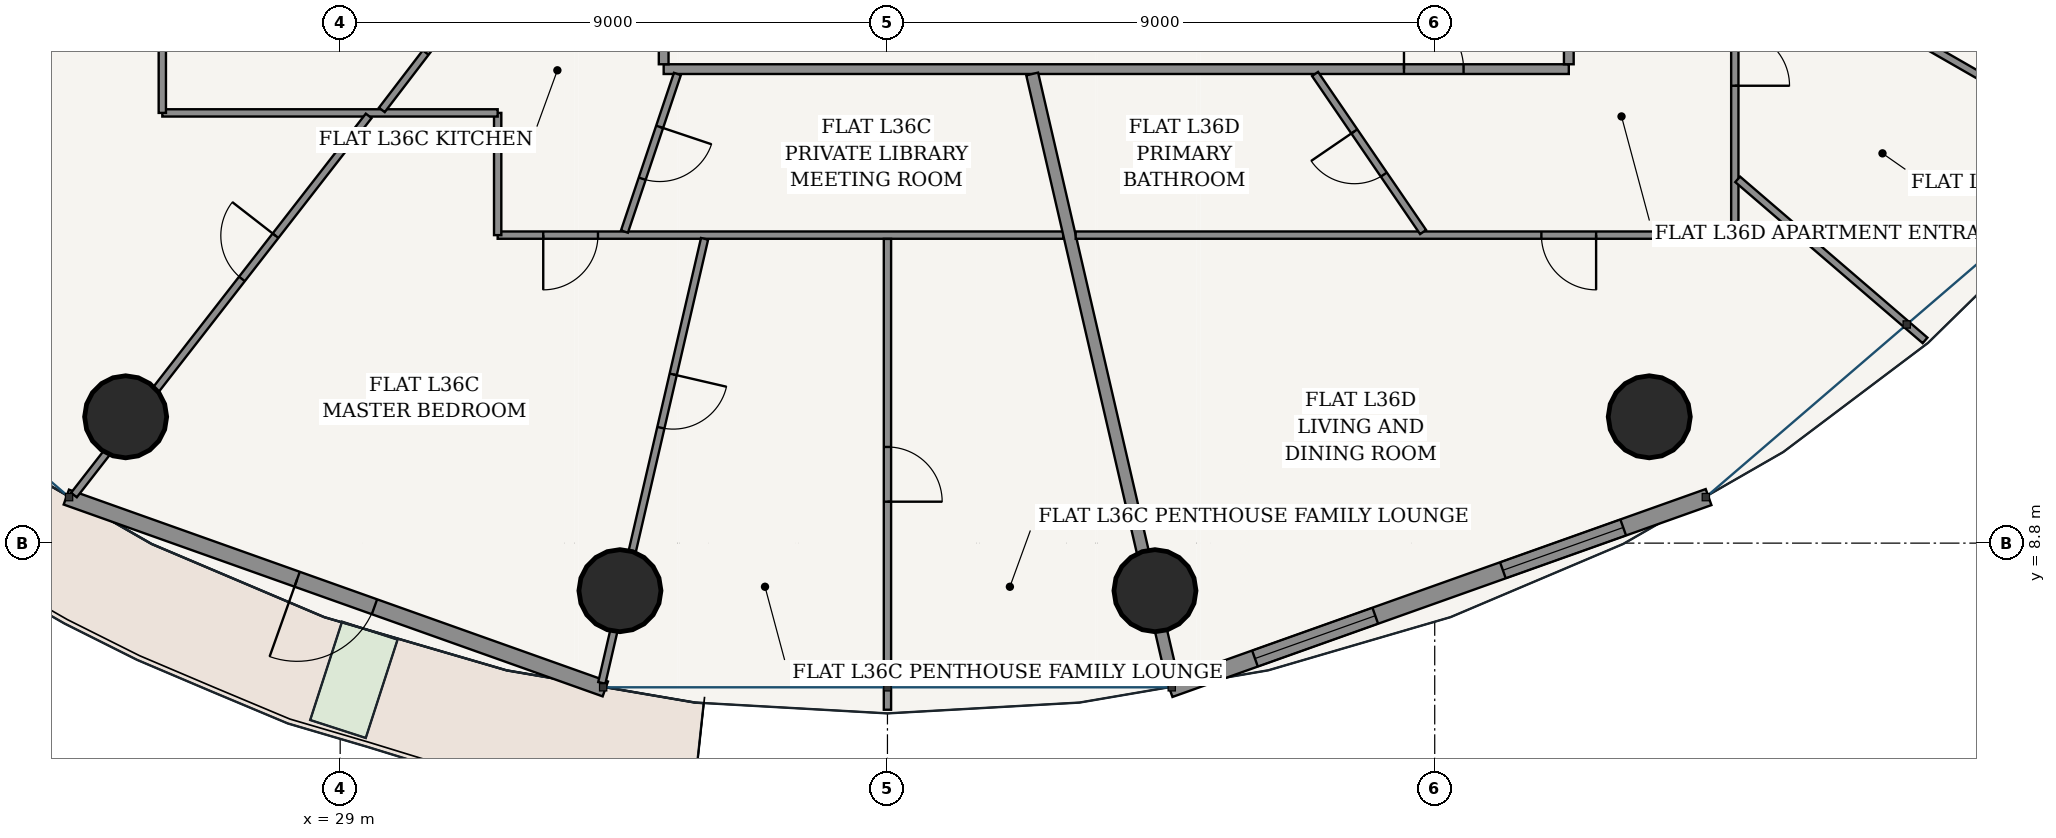
"""IFC4 building model, lengths in metres.
Left out: names, types, materials, properties, quantities, classifications, styles, units other than length and angle.
Written with IfcOpenShell. Run it as: python <this file> out.ifc"""

import sys

from ifc_helpers import new_model, si_unit, direction, frame, frame_2d, origin, origin_2d, place, context, subcontext, project, spatial, rectangle, hollow_circle, extrude, source, transform, mapped, element, fill, save


model = new_model("IFC4")
c1 = context("Model", 3, precision=1e-05, world=origin(), true_north=direction((-0.2419218956, 0.970295726276)))
c2 = subcontext(c1, "Body", "Model", "MODEL_VIEW")
j1 = project(units=[si_unit("LENGTHUNIT", "METRE"), si_unit("PLANEANGLEUNIT", "RADIAN")], contexts=[c1])
p1 = place(None, origin())
s1 = spatial("IfcSite", under=j1, at=p1, CompositionType="ELEMENT")
p2 = place(p1, origin())
s2 = spatial("IfcBuilding", under=s1, at=p2, CompositionType="ELEMENT")
p3 = place(p2, frame((0.0, 0.0, 139.0)))
s3 = spatial("IfcBuildingStorey", under=s2, at=p3, CompositionType="ELEMENT", Elevation=139.0)
for number, where, z_axis, x_axis in (
    (1, (25.472, 10.877, 0.0), (0.0, 0.0, 1.0), (1.0, 0.0, 0.0)),
    (2, (33.601, 8.018, 0.0), (0.0, 0.0, 1.0), (1.0, 0.0, 0.0)),
    (3, (42.399, 8.018, 0.0), (0.0, 0.0, 1.0), (1.0, 0.0, 0.0)),
    (4, (50.528, 10.877, 0.0), (0.0, 0.0, 1.0), (1.0, 0.0, 0.0)),
):
    element("IfcColumn", number, at=place(p3, frame(where, z_axis=z_axis, x_axis=x_axis)), inside=s3, PredefinedType="COLUMN", context=c2, shape_type="SweptSolid", body=[
        extrude(hollow_circle(Radius=0.675, WallThickness=0.042, at=origin_2d()), origin(), (0.0, 0.0, 1.0), 3.6),
    ])
p4 = place(p3, frame((24.497, 9.557, 0.0), z_axis=(0.0, 0.0, 1.0), x_axis=(0.942103604331, -0.335321932934, 0.0)))
e5 = element("IfcWall", 5, at=p4, inside=s3, PredefinedType="SOLIDWALL", context=c2, shape_type="SweptSolid", body=[
    extrude(rectangle(XDim=9.408, YDim=0.26, at=frame_2d((4.704, 0.0))), origin(), (0.0, 0.0, 1.0), 3.33),
])
p5 = place(p4, frame((4.029, 0.0, 0.0)))
e6 = element("IfcOpeningElement", 6, at=p5, cuts=e5, PredefinedType="OPENING", context=c2, shape_type="SweptSolid", body=[
    extrude(rectangle(XDim=1.35, YDim=2.2, at=frame_2d((0.675, 1.1))), frame((0.0, 0.14, 0.0), z_axis=(0.0, -1.0, 0.0), x_axis=(1.0, 0.0, 0.0)), (0.0, 0.0, 1.0), 0.28),
])
p6 = place(p3, frame((42.64, 6.402, 0.0), z_axis=(0.0, 0.0, 1.0), x_axis=(0.942103604331, 0.335321932934, 0.0)))
e7 = element("IfcWall", 7, at=p6, inside=s3, PredefinedType="SOLIDWALL", context=c2, shape_type="SweptSolid", body=[
    extrude(rectangle(XDim=9.408, YDim=0.28, at=frame_2d((4.704, 0.0))), origin(), (0.0, 0.0, 1.0), 3.33),
])
p7 = place(p6, frame((1.49, 0.0, 0.85)))
e8 = element("IfcOpeningElement", 8, at=p7, cuts=e7, PredefinedType="OPENING", context=c2, shape_type="SweptSolid", body=[
    extrude(rectangle(XDim=2.1, YDim=1.95, at=frame_2d((1.05, 0.975))), frame((0.0, 0.15, 0.0), z_axis=(0.0, -1.0, 0.0), x_axis=(1.0, 0.0, 0.0)), (0.0, 0.0, 1.0), 0.3),
])
p8 = place(p6, frame((5.818, 0.0, 0.85)))
e9 = element("IfcOpeningElement", 9, at=p8, cuts=e7, PredefinedType="OPENING", context=c2, shape_type="SweptSolid", body=[
    extrude(rectangle(XDim=2.1, YDim=1.95, at=frame_2d((1.05, 0.975))), frame((0.0, 0.15, 0.0), z_axis=(0.0, -1.0, 0.0), x_axis=(1.0, 0.0, 0.0)), (0.0, 0.0, 1.0), 0.3),
])
p9 = place(p3, frame((34.32, 16.595, 0.0), z_axis=(0.0, 0.0, 1.0), x_axis=(1.0, 0.0, 0.0)))
e10 = element("IfcWall", 10, at=p9, inside=s3, PredefinedType="PARTITIONING", context=c2, shape_type="SweptSolid", body=[
    extrude(rectangle(XDim=14.885, YDim=0.16, at=frame_2d((7.442, 0.0))), origin(), (0.0, 0.0, 1.0), 2.776),
])
p10 = place(p9, frame((12.174, 0.0, 0.0)))
e11 = element("IfcOpeningElement", 11, at=p10, cuts=e10, PredefinedType="OPENING", context=c2, shape_type="SweptSolid", body=[
    extrude(rectangle(XDim=0.98, YDim=2.2, at=frame_2d((0.49, 1.1))), frame((0.0, 0.09, 0.0), z_axis=(0.0, -1.0, 0.0), x_axis=(1.0, 0.0, 0.0)), (0.0, 0.0, 1.0), 0.18),
])
p11 = place(p3, frame((34.32, 16.675, 0.0), z_axis=(0.0, 0.0, 1.0), x_axis=(0.0, 1.0, 0.0)))
e12 = element("IfcWall", 12, at=p11, inside=s3, PredefinedType="PARTITIONING", context=c2, shape_type="SweptSolid", body=[
    extrude(rectangle(XDim=1.85, YDim=0.16, at=frame_2d((0.925, 0.0))), origin(), (0.0, 0.0, 1.0), 3.33),
])
p12 = place(p11, frame((0.435, 0.0, 0.0)))
e13 = element("IfcOpeningElement", 13, at=p12, cuts=e12, PredefinedType="OPENING", context=c2, shape_type="SweptSolid", body=[
    extrude(rectangle(XDim=0.98, YDim=2.2, at=frame_2d((0.49, 1.1))), frame((0.0, 0.09, 0.0), z_axis=(0.0, -1.0, 0.0), x_axis=(1.0, 0.0, 0.0)), (0.0, 0.0, 1.0), 0.18),
])
p13 = place(p3, frame((49.205, 16.675, 0.0), z_axis=(0.0, 0.0, 1.0), x_axis=(0.0, 1.0, 0.0)))
e14 = element("IfcWall", 14, at=p13, inside=s3, PredefinedType="PARTITIONING", context=c2, shape_type="SweptSolid", body=[
    extrude(rectangle(XDim=18.4, YDim=0.16, at=frame_2d((9.2, 0.0))), origin(), (0.0, 0.0, 1.0), 2.776),
])
p14 = place(p3, frame((40.892, 13.865, 0.0), z_axis=(0.0, 0.0, 1.0), x_axis=(-1.0, 0.0, 0.0)))
e15 = element("IfcWall", 15, at=p14, inside=s3, PredefinedType="PARTITIONING", context=c2, shape_type="SweptSolid", body=[
    extrude(rectangle(XDim=9.302, YDim=0.12, at=frame_2d((4.651, 0.0))), origin(), (0.0, 0.0, 1.0), 2.776),
])
p15 = place(p14, frame((7.652, 0.0, 0.0)))
e16 = element("IfcOpeningElement", 16, at=p15, cuts=e15, PredefinedType="OPENING", context=c2, shape_type="SweptSolid", body=[
    extrude(rectangle(XDim=0.9, YDim=2.15, at=frame_2d((0.45, 1.075))), frame((0.0, 0.07, 0.0), z_axis=(0.0, -1.0, 0.0), x_axis=(1.0, 0.0, 0.0)), (0.0, 0.0, 1.0), 0.14),
])
p16 = place(p3, frame((31.59, 13.865, 0.0), z_axis=(0.0, 0.0, 1.0), x_axis=(0.0, 1.0, 0.0)))
e17 = element("IfcWall", 17, at=p16, inside=s3, PredefinedType="PARTITIONING", context=c2, shape_type="SweptSolid", body=[
    extrude(rectangle(XDim=2.01, YDim=0.12, at=frame_2d((1.005, 0.0))), origin(), (0.0, 0.0, 1.0), 3.005),
])
p17 = place(p3, frame((31.59, 15.875, 0.0), z_axis=(0.0, 0.0, 1.0), x_axis=(-1.0, 0.0, 0.0)))
e18 = element("IfcWall", 18, at=p17, inside=s3, PredefinedType="PARTITIONING", context=c2, shape_type="SweptSolid", body=[
    extrude(rectangle(XDim=5.515, YDim=0.12, at=frame_2d((2.758, 0.0))), origin(), (0.0, 0.0, 1.0), 2.776),
])
p18 = place(p3, frame((26.075, 15.875, 0.0), z_axis=(0.0, 0.0, 1.0), x_axis=(0.0, 1.0, 0.0)))
e19 = element("IfcWall", 19, at=p18, inside=s3, PredefinedType="PARTITIONING", context=c2, shape_type="SweptSolid", body=[
    extrude(rectangle(XDim=5.715, YDim=0.12, at=frame_2d((2.857, 0.0))), origin(), (0.0, 0.0, 1.0), 2.776),
])
p19 = place(p3, frame((29.469, 15.826, 0.0), z_axis=(0.0, 0.0, 1.0), x_axis=(-0.61373942367, -0.789508657225, 0.0)))
e20 = element("IfcWall", 20, at=p19, inside=s3, PredefinedType="PARTITIONING", context=c2, shape_type="SweptSolid", body=[
    extrude(rectangle(XDim=7.898, YDim=0.12, at=frame_2d((3.949, 0.0))), origin(), (0.0, 0.0, 1.0), 2.776),
])
p20 = place(p19, frame((2.496, 0.0, 0.0)))
e21 = element("IfcOpeningElement", 21, at=p20, cuts=e20, PredefinedType="OPENING", context=c2, shape_type="SweptSolid", body=[
    extrude(rectangle(XDim=0.9, YDim=2.15, at=frame_2d((0.45, 1.075))), frame((0.0, 0.07, 0.0), z_axis=(0.0, -1.0, 0.0), x_axis=(1.0, 0.0, 0.0)), (0.0, 0.0, 1.0), 0.14),
])
p21 = place(p3, frame((34.992, 13.805, 0.0), z_axis=(0.0, 0.0, 1.0), x_axis=(-0.225447000045, -0.974255433739, 0.0)))
e22 = element("IfcWall", 22, at=p21, inside=s3, PredefinedType="PARTITIONING", context=c2, shape_type="SweptSolid", body=[
    extrude(rectangle(XDim=7.496, YDim=0.12, at=frame_2d((3.748, 0.0))), origin(), (0.0, 0.0, 1.0), 2.776),
])
p22 = place(p21, frame((2.289, 0.0, 0.0)))
e23 = element("IfcOpeningElement", 23, at=p22, cuts=e22, PredefinedType="OPENING", context=c2, shape_type="SweptSolid", body=[
    extrude(rectangle(XDim=0.9, YDim=2.15, at=frame_2d((0.45, 1.075))), frame((0.0, 0.07, 0.0), z_axis=(0.0, -1.0, 0.0), x_axis=(1.0, 0.0, 0.0)), (0.0, 0.0, 1.0), 0.14),
])
p23 = place(p3, frame((38.0, 13.803, 0.0), z_axis=(0.0, 0.0, 1.0), x_axis=(0.0, -1.0, 0.0)))
e24 = element("IfcWall", 24, at=p23, inside=s3, PredefinedType="PARTITIONING", context=c2, shape_type="SweptSolid", body=[
    extrude(rectangle(XDim=7.743, YDim=0.12, at=frame_2d((3.872, 0.0))), origin(), (0.0, 0.0, 1.0), 2.846),
])
p24 = place(p23, frame((3.421, 0.0, 0.0)))
e25 = element("IfcOpeningElement", 25, at=p24, cuts=e24, PredefinedType="OPENING", context=c2, shape_type="SweptSolid", body=[
    extrude(rectangle(XDim=0.9, YDim=2.15, at=frame_2d((0.45, 1.075))), frame((0.0, 0.07, 0.0), z_axis=(0.0, -1.0, 0.0), x_axis=(1.0, 0.0, 0.0)), (0.0, 0.0, 1.0), 0.14),
])
p25 = place(p3, frame((31.674, 18.525, 0.0), z_axis=(0.0, 0.0, 1.0), x_axis=(-0.607372594471, -0.794417101708, 0.0)))
e26 = element("IfcWall", 26, at=p25, inside=s3, PredefinedType="PARTITIONING", context=c2, shape_type="SweptSolid", body=[
    extrude(rectangle(XDim=3.274, YDim=0.12, at=frame_2d((1.637, 0.0))), origin(), (0.0, 0.0, 1.0), 3.33),
])
p26 = place(p25, frame((1.187, 0.0, 0.0)))
e27 = element("IfcOpeningElement", 27, at=p26, cuts=e26, PredefinedType="OPENING", context=c2, shape_type="SweptSolid", body=[
    extrude(rectangle(XDim=0.9, YDim=2.15, at=frame_2d((0.45, 1.075))), frame((0.0, 0.07, 0.0), z_axis=(0.0, -1.0, 0.0), x_axis=(1.0, 0.0, 0.0)), (0.0, 0.0, 1.0), 0.14),
])
p27 = place(p3, frame((34.545, 16.515, 0.0), z_axis=(0.0, 0.0, 1.0), x_axis=(-0.318424178642, -0.947948333221, 0.0)))
e28 = element("IfcWall", 28, at=p27, inside=s3, PredefinedType="PARTITIONING", context=c2, shape_type="SweptSolid", body=[
    extrude(rectangle(XDim=2.733, YDim=0.12, at=frame_2d((1.367, 0.0))), origin(), (0.0, 0.0, 1.0), 3.33),
])
p28 = place(p27, frame((0.917, 0.0, 0.0)))
e29 = element("IfcOpeningElement", 29, at=p28, cuts=e28, PredefinedType="OPENING", context=c2, shape_type="SweptSolid", body=[
    extrude(rectangle(XDim=0.9, YDim=2.15, at=frame_2d((0.45, 1.075))), frame((0.0, 0.07, 0.0), z_axis=(0.0, -1.0, 0.0), x_axis=(1.0, 0.0, 0.0)), (0.0, 0.0, 1.0), 0.14),
])
p29 = place(p3, frame((40.38, 16.515, 0.0), z_axis=(0.0, 0.0, 1.0), x_axis=(0.225473598067, -0.974249278457, 0.0)))
e30 = element("IfcWall", 30, at=p29, inside=s3, PredefinedType="PARTITIONING", context=c2, shape_type="SweptSolid", body=[
    extrude(rectangle(XDim=10.278, YDim=0.2, at=frame_2d((5.139, 0.0))), origin(), (0.0, 0.0, 1.0), 2.776),
])
p30 = place(p3, frame((51.935, 29.08, 0.0), z_axis=(0.0, 0.0, 1.0), x_axis=(0.0, -1.0, 0.0)))
e31 = element("IfcWall", 31, at=p30, inside=s3, PredefinedType="PARTITIONING", context=c2, shape_type="SweptSolid", body=[
    extrude(rectangle(XDim=15.215, YDim=0.12, at=frame_2d((7.608, 0.0))), origin(), (0.0, 0.0, 1.0), 2.776),
])
p31 = place(p30, frame((11.859, 0.0, 0.0)))
e32 = element("IfcOpeningElement", 32, at=p31, cuts=e31, PredefinedType="OPENING", context=c2, shape_type="SweptSolid", body=[
    extrude(rectangle(XDim=0.9, YDim=2.15, at=frame_2d((0.45, 1.075))), frame((0.0, 0.07, 0.0), z_axis=(0.0, -1.0, 0.0), x_axis=(1.0, 0.0, 0.0)), (0.0, 0.0, 1.0), 0.14),
])
p32 = place(p30, frame((7.49, 0.0, 0.0)))
e33 = element("IfcOpeningElement", 33, at=p32, cuts=e31, PredefinedType="OPENING", context=c2, shape_type="SweptSolid", body=[
    extrude(rectangle(XDim=0.9, YDim=2.15, at=frame_2d((0.45, 1.075))), frame((0.0, 0.07, 0.0), z_axis=(0.0, -1.0, 0.0), x_axis=(1.0, 0.0, 0.0)), (0.0, 0.0, 1.0), 0.14),
])
p33 = place(p3, frame((51.935, 13.865, 0.0), z_axis=(0.0, 0.0, 1.0), x_axis=(-1.0, 0.0, 0.0)))
e34 = element("IfcWall", 34, at=p33, inside=s3, PredefinedType="PARTITIONING", context=c2, shape_type="SweptSolid", body=[
    extrude(rectangle(XDim=10.84, YDim=0.12, at=frame_2d((5.42, 0.0))), origin(), (0.0, 0.0, 1.0), 2.776),
])
p34 = place(p33, frame((2.281, 0.0, 0.0)))
e35 = element("IfcOpeningElement", 35, at=p34, cuts=e34, PredefinedType="OPENING", context=c2, shape_type="SweptSolid", body=[
    extrude(rectangle(XDim=0.9, YDim=2.15, at=frame_2d((0.45, 1.075))), frame((0.0, 0.07, 0.0), z_axis=(0.0, -1.0, 0.0), x_axis=(1.0, 0.0, 0.0)), (0.0, 0.0, 1.0), 0.14),
])
p35 = place(p3, frame((51.982, 14.782, 0.0), z_axis=(0.0, 0.0, 1.0), x_axis=(0.758356837469, -0.651839632935, 0.0)))
e36 = element("IfcWall", 36, at=p35, inside=s3, PredefinedType="PARTITIONING", context=c2, shape_type="SweptSolid", body=[
    extrude(rectangle(XDim=4.064, YDim=0.12, at=frame_2d((2.032, 0.0))), origin(), (0.0, 0.0, 1.0), 2.846),
])
p36 = place(p3, frame((51.989, 18.766, 0.0), z_axis=(0.0, 0.0, 1.0), x_axis=(0.86717064002, -0.498011125466, 0.0)))
e37 = element("IfcWall", 37, at=p36, inside=s3, PredefinedType="PARTITIONING", context=c2, shape_type="SweptSolid", body=[
    extrude(rectangle(XDim=6.961, YDim=0.12, at=frame_2d((3.48, 0.0))), origin(), (0.0, 0.0, 1.0), 2.776),
])
p37 = place(p3, frame((45.032, 16.515, 0.0), z_axis=(0.0, 0.0, 1.0), x_axis=(0.564486512722, -0.825442291717, 0.0)))
e38 = element("IfcWall", 38, at=p37, inside=s3, PredefinedType="PARTITIONING", context=c2, shape_type="SweptSolid", body=[
    extrude(rectangle(XDim=3.148, YDim=0.12, at=frame_2d((1.574, 0.0))), origin(), (0.0, 0.0, 1.0), 3.005),
])
p38 = place(p37, frame((1.144, 0.0, 0.0)))
e39 = element("IfcOpeningElement", 39, at=p38, cuts=e38, PredefinedType="OPENING", context=c2, shape_type="SweptSolid", body=[
    extrude(rectangle(XDim=0.86, YDim=2.15, at=frame_2d((0.43, 1.075))), frame((0.0, 0.07, 0.0), z_axis=(0.0, -1.0, 0.0), x_axis=(1.0, 0.0, 0.0)), (0.0, 0.0, 1.0), 0.14),
])
m1 = source(origin(), c2, "Body", "SweptSolid", [
    extrude(rectangle(XDim=1.35, YDim=2.2, at=frame_2d((0.675, 1.1))), frame((0.0, 0.025, 0.0), z_axis=(0.0, -1.0, 0.0), x_axis=(1.0, 0.0, 0.0)), (0.0, 0.0, 1.0), 0.05),
])
p39 = place(p5, frame((1.35, 0.0, 0.0), z_axis=(0.0, 0.0, 1.0), x_axis=(-1.0, 0.0, 0.0)))
e40 = element("IfcDoor", 40, at=p39, inside=s3, OperationType="SINGLE_SWING_RIGHT", PredefinedType="DOOR", context=c2, shape_type="MappedRepresentation", body=[
    mapped(m1, transform((0.0, 0.0, 0.0), scale=1.0)),
])
fill(e6, e40)
m2 = source(origin(), c2, "Body", "SweptSolid", [
    extrude(rectangle(XDim=2.1, YDim=1.95, at=frame_2d((1.05, 0.975))), frame((0.0, 0.03, 0.0), z_axis=(0.0, -1.0, 0.0), x_axis=(1.0, 0.0, 0.0)), (0.0, 0.0, 1.0), 0.06),
])
p40 = place(p7, origin())
e41 = element("IfcWindow", 41, at=p40, inside=s3, PartitioningType="SINGLE_PANEL", PredefinedType="WINDOW", context=c2, shape_type="MappedRepresentation", body=[
    mapped(m2, transform((0.0, 0.0, 0.0), scale=1.0)),
])
fill(e8, e41)
p41 = place(p8, origin())
e42 = element("IfcWindow", 42, at=p41, inside=s3, PartitioningType="SINGLE_PANEL", PredefinedType="WINDOW", context=c2, shape_type="MappedRepresentation", body=[
    mapped(m2, transform((0.0, 0.0, 0.0), scale=1.0)),
])
fill(e9, e42)
m3 = source(origin(), c2, "Body", "SweptSolid", [
    extrude(rectangle(XDim=0.9, YDim=2.15, at=frame_2d((0.45, 1.075))), frame((0.0, 0.025, 0.0), z_axis=(0.0, -1.0, 0.0), x_axis=(1.0, 0.0, 0.0)), (0.0, 0.0, 1.0), 0.05),
])
p42 = place(p26, frame((0.9, 0.0, 0.0), z_axis=(0.0, 0.0, 1.0), x_axis=(-1.0, 0.0, 0.0)))
e43 = element("IfcDoor", 43, at=p42, inside=s3, OperationType="SINGLE_SWING_RIGHT", PredefinedType="DOOR", context=c2, shape_type="MappedRepresentation", body=[
    mapped(m3, transform((0.0, 0.0, 0.0), scale=1.0)),
])
fill(e27, e43)
p43 = place(p28, origin())
e44 = element("IfcDoor", 44, at=p43, inside=s3, OperationType="SINGLE_SWING_LEFT", PredefinedType="DOOR", context=c2, shape_type="MappedRepresentation", body=[
    mapped(m3, transform((0.0, 0.0, 0.0), scale=1.0)),
])
fill(e29, e44)
p44 = place(p15, origin())
e45 = element("IfcDoor", 45, at=p44, inside=s3, OperationType="SINGLE_SWING_RIGHT", PredefinedType="DOOR", context=c2, shape_type="MappedRepresentation", body=[
    mapped(m3, transform((0.0, 0.0, 0.0), scale=1.0)),
])
fill(e16, e45)
p45 = place(p20, frame((0.9, 0.0, 0.0), z_axis=(0.0, 0.0, 1.0), x_axis=(-1.0, 0.0, 0.0)))
e46 = element("IfcDoor", 46, at=p45, inside=s3, OperationType="SINGLE_SWING_RIGHT", PredefinedType="DOOR", context=c2, shape_type="MappedRepresentation", body=[
    mapped(m3, transform((0.0, 0.0, 0.0), scale=1.0)),
])
fill(e21, e46)
p46 = place(p22, origin())
e47 = element("IfcDoor", 47, at=p46, inside=s3, OperationType="SINGLE_SWING_LEFT", PredefinedType="DOOR", context=c2, shape_type="MappedRepresentation", body=[
    mapped(m3, transform((0.0, 0.0, 0.0), scale=1.0)),
])
fill(e23, e47)
p47 = place(p24, origin())
e48 = element("IfcDoor", 48, at=p47, inside=s3, OperationType="SINGLE_SWING_RIGHT", PredefinedType="DOOR", context=c2, shape_type="MappedRepresentation", body=[
    mapped(m3, transform((0.0, 0.0, 0.0), scale=1.0)),
])
fill(e25, e48)
m4 = source(origin(), c2, "Body", "SweptSolid", [
    extrude(rectangle(XDim=0.98, YDim=2.2, at=frame_2d((0.49, 1.1))), frame((0.0, 0.025, 0.0), z_axis=(0.0, -1.0, 0.0), x_axis=(1.0, 0.0, 0.0)), (0.0, 0.0, 1.0), 0.05),
])
p48 = place(p10, origin())
e49 = element("IfcDoor", 49, at=p48, inside=s3, OperationType="SINGLE_SWING_LEFT", PredefinedType="DOOR", context=c2, shape_type="MappedRepresentation", body=[
    mapped(m4, transform((0.0, 0.0, 0.0), scale=1.0)),
])
fill(e11, e49)
m5 = source(origin(), c2, "Body", "SweptSolid", [
    extrude(rectangle(XDim=0.86, YDim=2.15, at=frame_2d((0.43, 1.075))), frame((0.0, 0.025, 0.0), z_axis=(0.0, -1.0, 0.0), x_axis=(1.0, 0.0, 0.0)), (0.0, 0.0, 1.0), 0.05),
])
p49 = place(p38, frame((0.86, 0.0, 0.0), z_axis=(0.0, 0.0, 1.0), x_axis=(-1.0, 0.0, 0.0)))
e50 = element("IfcDoor", 50, at=p49, inside=s3, OperationType="SINGLE_SWING_RIGHT", PredefinedType="DOOR", context=c2, shape_type="MappedRepresentation", body=[
    mapped(m5, transform((0.0, 0.0, 0.0), scale=1.0)),
])
fill(e39, e50)
p50 = place(p34, origin())
e51 = element("IfcDoor", 51, at=p50, inside=s3, OperationType="SINGLE_SWING_LEFT", PredefinedType="DOOR", context=c2, shape_type="MappedRepresentation", body=[
    mapped(m3, transform((0.0, 0.0, 0.0), scale=1.0)),
])
fill(e35, e51)
p51 = place(p31, origin())
e52 = element("IfcDoor", 52, at=p51, inside=s3, OperationType="SINGLE_SWING_RIGHT", PredefinedType="DOOR", context=c2, shape_type="MappedRepresentation", body=[
    mapped(m3, transform((0.0, 0.0, 0.0), scale=1.0)),
])
fill(e32, e52)
save(model, sys.argv[1])
